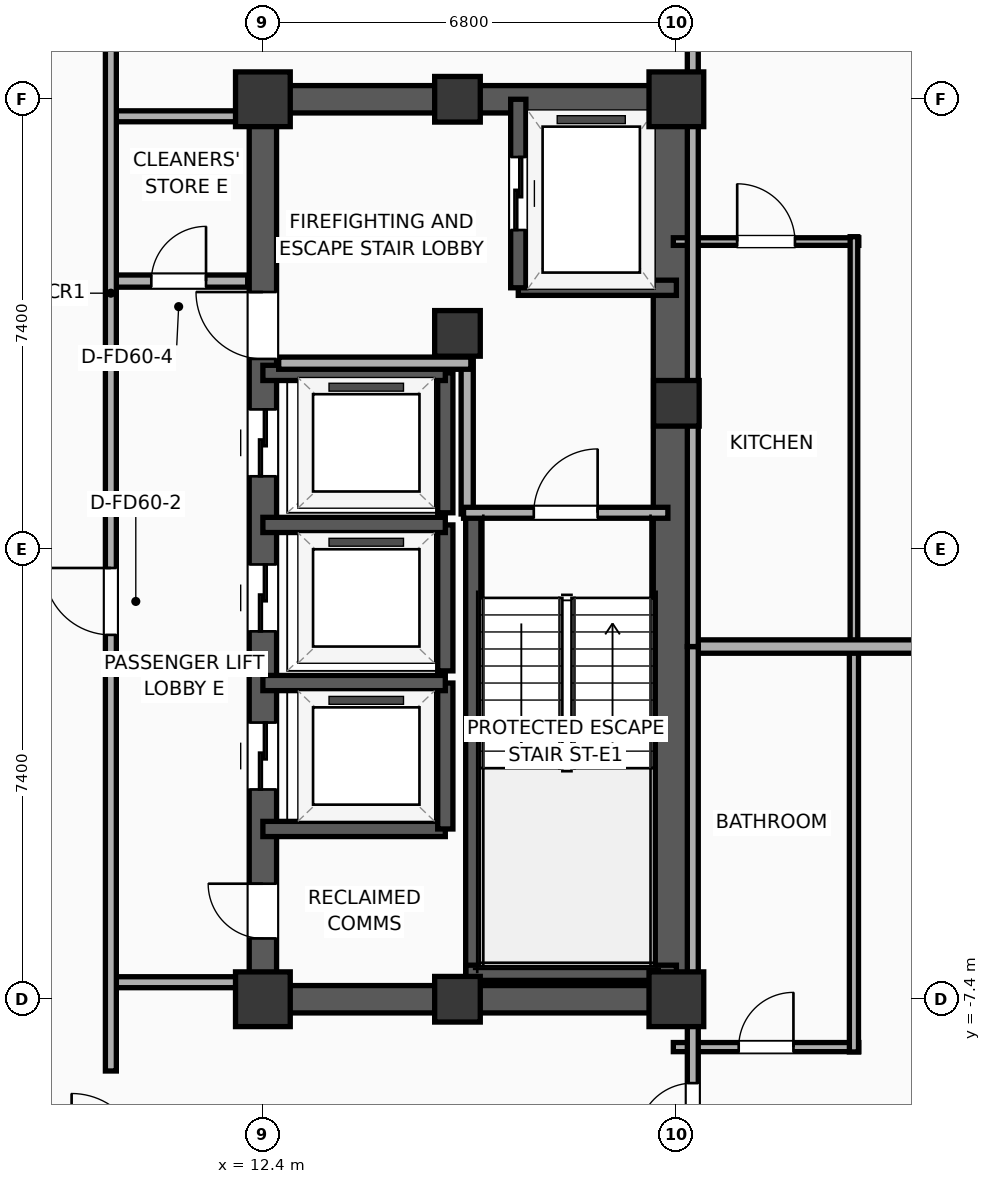
"""IFC4 building model, lengths in metres.
Left out: names, types, materials, properties, quantities, classifications, styles, units other than length and angle.
Written with IfcOpenShell. Run it as: python <this file> out.ifc"""

import sys

from ifc_helpers import new_model, si_unit, direction, frame, frame_2d, origin, origin_2d, place, context, subcontext, project, spatial, rectangle, extrude, element, fill, save


model = new_model("IFC4")
c1 = context("Model", 3, precision=1e-05, world=origin(), true_north=direction((0.0, 1.0)))
c2 = subcontext(c1, "Body", "Model", "MODEL_VIEW")
j1 = project(units=[si_unit("LENGTHUNIT", "METRE"), si_unit("PLANEANGLEUNIT", "RADIAN")], contexts=[c1])
p1 = place(None, origin())
s1 = spatial("IfcSite", under=j1, at=p1, CompositionType="ELEMENT")
p2 = place(p1, origin())
s2 = spatial("IfcBuilding", under=s1, at=p2, CompositionType="ELEMENT")
p3 = place(p2, frame((0.0, 0.0, 200.2)))
s3 = spatial("IfcBuildingStorey", under=s2, at=p3, CompositionType="ELEMENT", Elevation=200.2)
p4 = place(p3, frame((12.4, -7.4, 0.0), z_axis=(0.0, 0.0, 1.0), x_axis=(1.0, 0.0, 0.0)))
e1 = element("IfcColumn", 1, at=p4, inside=s3, PredefinedType="COLUMN", context=c2, shape_type="SweptSolid", body=[
    extrude(rectangle(XDim=0.9, YDim=0.9, at=origin_2d()), origin(), (0.0, 0.0, 1.0), 3.9),
])
p5 = place(p3, frame((15.6, 3.55, 0.0), z_axis=(0.0, 0.0, 1.0), x_axis=(1.0, 0.0, 0.0)))
e2 = element("IfcColumn", 2, at=p5, inside=s3, PredefinedType="COLUMN", context=c2, shape_type="SweptSolid", body=[
    extrude(rectangle(XDim=0.75, YDim=0.75, at=origin_2d()), origin(), (0.0, 0.0, 1.0), 3.9),
])
p6 = place(p3, frame((12.4, 7.4, 0.0), z_axis=(0.0, 0.0, 1.0), x_axis=(1.0, 0.0, 0.0)))
e3 = element("IfcColumn", 3, at=p6, inside=s3, PredefinedType="COLUMN", context=c2, shape_type="SweptSolid", body=[
    extrude(rectangle(XDim=0.9, YDim=0.9, at=origin_2d()), origin(), (0.0, 0.0, 1.0), 3.9),
])
for number, where, z_axis, x_axis in (
    (4, (15.6, -7.4, 0.0), (0.0, 0.0, 1.0), (1.0, 0.0, 0.0)),
    (5, (15.6, 7.4, 0.0), (0.0, 0.0, 1.0), (1.0, 0.0, 0.0)),
):
    element("IfcColumn", number, at=place(p3, frame(where, z_axis=z_axis, x_axis=x_axis)), inside=s3, PredefinedType="COLUMN", context=c2, shape_type="SweptSolid", body=[
        extrude(rectangle(XDim=0.75, YDim=0.75, at=origin_2d()), origin(), (0.0, 0.0, 1.0), 3.9),
    ])
p7 = place(p3, frame((19.2, -7.4, 0.0), z_axis=(0.0, 0.0, 1.0), x_axis=(1.0, 0.0, 0.0)))
e6 = element("IfcColumn", 6, at=p7, inside=s3, PredefinedType="COLUMN", context=c2, shape_type="SweptSolid", body=[
    extrude(rectangle(XDim=0.9, YDim=0.9, at=origin_2d()), origin(), (0.0, 0.0, 1.0), 3.9),
])
p8 = place(p3, frame((19.2, 2.4, 0.0), z_axis=(0.0, 0.0, 1.0), x_axis=(1.0, 0.0, 0.0)))
e7 = element("IfcColumn", 7, at=p8, inside=s3, PredefinedType="COLUMN", context=c2, shape_type="SweptSolid", body=[
    extrude(rectangle(XDim=0.75, YDim=0.75, at=origin_2d()), origin(), (0.0, 0.0, 1.0), 3.9),
])
p9 = place(p3, frame((19.2, 7.4, 0.0), z_axis=(0.0, 0.0, 1.0), x_axis=(1.0, 0.0, 0.0)))
e8 = element("IfcColumn", 8, at=p9, inside=s3, PredefinedType="COLUMN", context=c2, shape_type="SweptSolid", body=[
    extrude(rectangle(XDim=0.9, YDim=0.9, at=origin_2d()), origin(), (0.0, 0.0, 1.0), 3.9),
])
for number, where, z_axis, x_axis in (
    (9, (12.175, -7.4, 0.0), (0.0, 0.0, 1.0), (1.0, 0.0, 0.0)),
    (10, (12.175, 7.4, 0.0), (0.0, 0.0, 1.0), (1.0, 0.0, 0.0)),
):
    element("IfcWall", number, at=place(p3, frame(where, z_axis=z_axis, x_axis=x_axis)), inside=s3, PredefinedType="SHEAR", context=c2, shape_type="SweptSolid", body=[
        extrude(rectangle(XDim=7.25, YDim=0.45, at=frame_2d((3.625, 0.0))), origin(), (0.0, 0.0, 1.0), 3.65),
    ])
p10 = place(p3, frame((12.4, -7.4, 0.0), z_axis=(0.0, 0.0, 1.0), x_axis=(0.0, 1.0, 0.0)))
e11 = element("IfcWall", 11, at=p10, inside=s3, PredefinedType="SHEAR", context=c2, shape_type="SweptSolid", body=[
    extrude(rectangle(XDim=14.8, YDim=0.45, at=frame_2d((7.4, 0.0))), origin(), (0.0, 0.0, 1.0), 3.65),
])
p11 = place(p10, frame((3.45, 0.0, 0.0)))
e12 = element("IfcOpeningElement", 12, at=p11, cuts=e11, PredefinedType="OPENING", context=c2, shape_type="SweptSolid", body=[
    extrude(rectangle(XDim=1.1, YDim=2.05, at=frame_2d((0.55, 1.025))), frame((0.0, 0.235, 0.0), z_axis=(0.0, -1.0, 0.0), x_axis=(1.0, 0.0, 0.0)), (0.0, 0.0, 1.0), 0.47),
])
p12 = place(p10, frame((6.05, 0.0, 0.0)))
e13 = element("IfcOpeningElement", 13, at=p12, cuts=e11, PredefinedType="OPENING", context=c2, shape_type="SweptSolid", body=[
    extrude(rectangle(XDim=1.1, YDim=2.05, at=frame_2d((0.55, 1.025))), frame((0.0, 0.235, 0.0), z_axis=(0.0, -1.0, 0.0), x_axis=(1.0, 0.0, 0.0)), (0.0, 0.0, 1.0), 0.47),
])
p13 = place(p10, frame((8.6, 0.0, 0.0)))
e14 = element("IfcOpeningElement", 14, at=p13, cuts=e11, PredefinedType="OPENING", context=c2, shape_type="SweptSolid", body=[
    extrude(rectangle(XDim=1.1, YDim=2.05, at=frame_2d((0.55, 1.025))), frame((0.0, 0.235, 0.0), z_axis=(0.0, -1.0, 0.0), x_axis=(1.0, 0.0, 0.0)), (0.0, 0.0, 1.0), 0.47),
])
p14 = place(p10, frame((10.53, 0.0, 0.0)))
e15 = element("IfcOpeningElement", 15, at=p14, cuts=e11, PredefinedType="OPENING", context=c2, shape_type="SweptSolid", body=[
    extrude(rectangle(XDim=1.1, YDim=2.05, at=frame_2d((0.55, 1.025))), frame((0.0, 0.235, 0.0), z_axis=(0.0, -1.0, 0.0), x_axis=(1.0, 0.0, 0.0)), (0.0, 0.0, 1.0), 0.47),
])
p15 = place(p10, frame((1.0, 0.0, 0.0)))
e16 = element("IfcOpeningElement", 16, at=p15, cuts=e11, PredefinedType="OPENING", context=c2, shape_type="SweptSolid", body=[
    extrude(rectangle(XDim=0.9, YDim=2.05, at=frame_2d((0.45, 1.025))), frame((0.0, 0.235, 0.0), z_axis=(0.0, -1.0, 0.0), x_axis=(1.0, 0.0, 0.0)), (0.0, 0.0, 1.0), 0.47),
])
p16 = place(p3, frame((19.145, -7.4, 0.0), z_axis=(0.0, 0.0, 1.0), x_axis=(0.0, 1.0, 0.0)))
e17 = element("IfcWall", 17, at=p16, inside=s3, PredefinedType="SHEAR", context=c2, shape_type="SweptSolid", body=[
    extrude(rectangle(XDim=14.8, YDim=0.65, at=frame_2d((7.4, 0.0))), origin(), (0.0, 0.0, 1.0), 3.65),
])
p17 = place(p3, frame((15.86, -7.085, 0.0), z_axis=(0.0, 0.0, 1.0), x_axis=(0.0, 1.0, 0.0)))
e18 = element("IfcWall", 18, at=p17, inside=s3, PredefinedType="SOLIDWALL", context=c2, shape_type="SweptSolid", body=[
    extrude(rectangle(XDim=7.685, YDim=0.25, at=frame_2d((3.843, 0.0))), origin(), (0.0, 0.0, 1.0), 3.65),
])
p18 = place(p3, frame((15.74, -6.965, 0.0), z_axis=(0.0, 0.0, 1.0), x_axis=(1.0, 0.0, 0.0)))
e19 = element("IfcWall", 19, at=p18, inside=s3, PredefinedType="SOLIDWALL", context=c2, shape_type="SweptSolid", body=[
    extrude(rectangle(XDim=3.46, YDim=0.25, at=frame_2d((1.73, 0.0))), origin(), (0.0, 0.0, 1.0), 3.65),
])
p19 = place(p3, frame((16.6, 4.3, 0.0), z_axis=(0.0, 0.0, 1.0), x_axis=(1.0, 0.0, 0.0)))
e20 = element("IfcWall", 20, at=p19, inside=s3, PredefinedType="SOLIDWALL", context=c2, shape_type="SweptSolid", body=[
    extrude(rectangle(XDim=2.6, YDim=0.25, at=frame_2d((1.3, 0.0))), origin(), (0.0, 0.0, 1.0), 3.65),
])
p20 = place(p3, frame((16.6, 7.4, 0.0), z_axis=(0.0, 0.0, 1.0), x_axis=(0.0, -1.0, 0.0)))
e21 = element("IfcWall", 21, at=p20, inside=s3, PredefinedType="SOLIDWALL", context=c2, shape_type="SweptSolid", body=[
    extrude(rectangle(XDim=3.1, YDim=0.25, at=frame_2d((1.55, 0.0))), origin(), (0.0, 0.0, 1.0), 3.65),
])
p21 = place(p20, frame((0.95, 0.0, 0.0)))
e22 = element("IfcOpeningElement", 22, at=p21, cuts=e21, PredefinedType="OPENING", context=c2, shape_type="SweptSolid", body=[
    extrude(rectangle(XDim=1.2, YDim=2.05, at=frame_2d((0.6, 1.025))), frame((0.0, 0.135, 0.0), z_axis=(0.0, -1.0, 0.0), x_axis=(1.0, 0.0, 0.0)), (0.0, 0.0, 1.0), 0.27),
])
p22 = place(p3, frame((12.4, -4.6, 0.0), z_axis=(0.0, 0.0, 1.0), x_axis=(1.0, 0.0, 0.0)))
e23 = element("IfcWall", 23, at=p22, inside=s3, PredefinedType="SOLIDWALL", context=c2, shape_type="SweptSolid", body=[
    extrude(rectangle(XDim=3.0, YDim=0.25, at=frame_2d((1.5, 0.0))), origin(), (0.0, 0.0, 1.0), 3.65),
])
p23 = place(p3, frame((15.4, -4.6, 0.0), z_axis=(0.0, 0.0, 1.0), x_axis=(0.0, 1.0, 0.0)))
e24 = element("IfcWall", 24, at=p23, inside=s3, PredefinedType="SOLIDWALL", context=c2, shape_type="SweptSolid", body=[
    extrude(rectangle(XDim=2.4, YDim=0.25, at=frame_2d((1.2, 0.0))), origin(), (0.0, 0.0, 1.0), 3.65),
])
p24 = place(p3, frame((15.4, -2.2, 0.0), z_axis=(0.0, 0.0, 1.0), x_axis=(-1.0, 0.0, 0.0)))
e25 = element("IfcWall", 25, at=p24, inside=s3, PredefinedType="SOLIDWALL", context=c2, shape_type="SweptSolid", body=[
    extrude(rectangle(XDim=3.0, YDim=0.25, at=frame_2d((1.5, 0.0))), origin(), (0.0, 0.0, 1.0), 3.65),
])
p25 = place(p3, frame((15.4, -2.0, 0.0), z_axis=(0.0, 0.0, 1.0), x_axis=(0.0, 1.0, 0.0)))
e26 = element("IfcWall", 26, at=p25, inside=s3, PredefinedType="SOLIDWALL", context=c2, shape_type="SweptSolid", body=[
    extrude(rectangle(XDim=2.4, YDim=0.25, at=frame_2d((1.2, 0.0))), origin(), (0.0, 0.0, 1.0), 3.65),
])
p26 = place(p3, frame((15.4, 0.4, 0.0), z_axis=(0.0, 0.0, 1.0), x_axis=(-1.0, 0.0, 0.0)))
e27 = element("IfcWall", 27, at=p26, inside=s3, PredefinedType="SOLIDWALL", context=c2, shape_type="SweptSolid", body=[
    extrude(rectangle(XDim=3.0, YDim=0.25, at=frame_2d((1.5, 0.0))), origin(), (0.0, 0.0, 1.0), 3.65),
])
p27 = place(p3, frame((15.4, 0.6, 0.0), z_axis=(0.0, 0.0, 1.0), x_axis=(0.0, 1.0, 0.0)))
e28 = element("IfcWall", 28, at=p27, inside=s3, PredefinedType="SOLIDWALL", context=c2, shape_type="SweptSolid", body=[
    extrude(rectangle(XDim=2.3, YDim=0.25, at=frame_2d((1.15, 0.0))), origin(), (0.0, 0.0, 1.0), 3.65),
])
p28 = place(p3, frame((15.4, 2.9, 0.0), z_axis=(0.0, 0.0, 1.0), x_axis=(-1.0, 0.0, 0.0)))
e29 = element("IfcWall", 29, at=p28, inside=s3, PredefinedType="SOLIDWALL", context=c2, shape_type="SweptSolid", body=[
    extrude(rectangle(XDim=3.0, YDim=0.25, at=frame_2d((1.5, 0.0))), origin(), (0.0, 0.0, 1.0), 3.65),
])
p29 = place(p3, frame((15.76, 0.58, 0.0), z_axis=(0.0, 0.0, 1.0), x_axis=(0.0, 1.0, 0.0)))
e30 = element("IfcWall", 30, at=p29, inside=s3, PredefinedType="PARTITIONING", context=c2, shape_type="SweptSolid", body=[
    extrude(rectangle(XDim=2.52, YDim=0.2, at=frame_2d((1.26, 0.0))), origin(), (0.0, 0.0, 1.0), 3.65),
])
p30 = place(p3, frame((12.66, 3.06, 0.0), z_axis=(0.0, 0.0, 1.0), x_axis=(1.0, 0.0, 0.0)))
e31 = element("IfcWall", 31, at=p30, inside=s3, PredefinedType="PARTITIONING", context=c2, shape_type="SweptSolid", body=[
    extrude(rectangle(XDim=3.16, YDim=0.2, at=frame_2d((1.58, 0.0))), origin(), (0.0, 0.0, 1.0), 3.65),
])
p31 = place(p3, frame((15.7, 0.6, 0.0), z_axis=(0.0, 0.0, 1.0), x_axis=(1.0, 0.0, 0.0)))
e32 = element("IfcWall", 32, at=p31, inside=s3, PredefinedType="PARTITIONING", context=c2, shape_type="SweptSolid", body=[
    extrude(rectangle(XDim=3.36, YDim=0.18, at=frame_2d((1.68, 0.0))), origin(), (0.0, 0.0, 1.0), 3.65),
])
p32 = place(p31, frame((1.155, 0.0, 0.0)))
e33 = element("IfcOpeningElement", 33, at=p32, cuts=e32, PredefinedType="OPENING", context=c2, shape_type="SweptSolid", body=[
    extrude(rectangle(XDim=1.05, YDim=2.05, at=frame_2d((0.525, 1.025))), frame((0.0, 0.1, 0.0), z_axis=(0.0, -1.0, 0.0), x_axis=(1.0, 0.0, 0.0)), (0.0, 0.0, 1.0), 0.2),
])
p33 = place(p3, frame((9.88, 4.41, 0.0), z_axis=(0.0, 0.0, 1.0), x_axis=(1.0, 0.0, 0.0)))
e34 = element("IfcWall", 34, at=p33, inside=s3, PredefinedType="PARTITIONING", context=c2, shape_type="SweptSolid", body=[
    extrude(rectangle(XDim=2.27, YDim=0.2, at=frame_2d((1.135, 0.0))), origin(), (0.0, 0.0, 1.0), 3.65),
])
p34 = place(p33, frame((0.685, 0.0, 0.0)))
e35 = element("IfcOpeningElement", 35, at=p34, cuts=e34, PredefinedType="OPENING", context=c2, shape_type="SweptSolid", body=[
    extrude(rectangle(XDim=0.9, YDim=2.05, at=frame_2d((0.45, 1.025))), frame((0.0, 0.11, 0.0), z_axis=(0.0, -1.0, 0.0), x_axis=(1.0, 0.0, 0.0)), (0.0, 0.0, 1.0), 0.22),
])
for number, where, z_axis, x_axis in (
    (36, (9.88, 7.12, 0.0), (0.0, 0.0, 1.0), (1.0, 0.0, 0.0)),
    (37, (9.88, -7.12, 0.0), (0.0, 0.0, 1.0), (1.0, 0.0, 0.0)),
):
    element("IfcWall", number, at=place(p3, frame(where, z_axis=z_axis, x_axis=x_axis)), inside=s3, PredefinedType="PARTITIONING", context=c2, shape_type="SweptSolid", body=[
        extrude(rectangle(XDim=2.27, YDim=0.18, at=frame_2d((1.135, 0.0))), origin(), (0.0, 0.0, 1.0), 3.65),
    ])
p35 = place(p3, frame((9.9, -8.58, 0.0), z_axis=(0.0, 0.0, 1.0), x_axis=(0.0, 1.0, 0.0)))
e38 = element("IfcWall", 38, at=p35, inside=s3, PredefinedType="PARTITIONING", context=c2, shape_type="SweptSolid", body=[
    extrude(rectangle(XDim=17.16, YDim=0.18, at=frame_2d((8.58, 0.0))), origin(), (0.0, 0.0, 1.0), 3.65),
])
p36 = place(p35, frame((7.172, 0.0, 0.0)))
e39 = element("IfcOpeningElement", 39, at=p36, cuts=e38, PredefinedType="OPENING", context=c2, shape_type="SweptSolid", body=[
    extrude(rectangle(XDim=1.1, YDim=2.05, at=frame_2d((0.55, 1.025))), frame((0.0, 0.1, 0.0), z_axis=(0.0, -1.0, 0.0), x_axis=(1.0, 0.0, 0.0)), (0.0, 0.0, 1.0), 0.2),
])
p37 = place(p3, frame((19.15, -8.187, 0.0), z_axis=(0.0, 0.0, 1.0), x_axis=(1.0, 0.0, 0.0)))
e40 = element("IfcWall", 40, at=p37, inside=s3, PredefinedType="PLUMBINGWALL", context=c2, shape_type="SweptSolid", body=[
    extrude(rectangle(XDim=3.05, YDim=0.15, at=frame_2d((1.525, 0.0))), origin(), (0.0, 0.0, 1.0), 3.65),
])
p38 = place(p37, frame((1.075, 0.0, 0.0)))
e41 = element("IfcOpeningElement", 41, at=p38, cuts=e40, PredefinedType="OPENING", context=c2, shape_type="SweptSolid", body=[
    extrude(rectangle(XDim=0.9, YDim=2.05, at=frame_2d((0.45, 1.025))), frame((0.0, 0.085, 0.0), z_axis=(0.0, -1.0, 0.0), x_axis=(1.0, 0.0, 0.0)), (0.0, 0.0, 1.0), 0.17),
])
p39 = place(p3, frame((22.12, -8.267, 0.0), z_axis=(0.0, 0.0, 1.0), x_axis=(0.0, 1.0, 0.0)))
e42 = element("IfcWall", 42, at=p39, inside=s3, PredefinedType="PLUMBINGWALL", context=c2, shape_type="SweptSolid", body=[
    extrude(rectangle(XDim=6.647, YDim=0.15, at=frame_2d((3.323, 0.0))), origin(), (0.0, 0.0, 1.0), 3.65),
])
p40 = place(p3, frame((19.15, 5.06, 0.0), z_axis=(0.0, 0.0, 1.0), x_axis=(1.0, 0.0, 0.0)))
e43 = element("IfcWall", 43, at=p40, inside=s3, PredefinedType="PARTITIONING", context=c2, shape_type="SweptSolid", body=[
    extrude(rectangle(XDim=3.05, YDim=0.125, at=frame_2d((1.525, 0.0))), origin(), (0.0, 0.0, 1.0), 3.65),
])
p41 = place(p40, frame((1.05, 0.0, 0.0)))
e44 = element("IfcOpeningElement", 44, at=p41, cuts=e43, PredefinedType="OPENING", context=c2, shape_type="SweptSolid", body=[
    extrude(rectangle(XDim=0.95, YDim=2.05, at=frame_2d((0.475, 1.025))), frame((0.0, 0.073, 0.0), z_axis=(0.0, -1.0, 0.0), x_axis=(1.0, 0.0, 0.0)), (0.0, 0.0, 1.0), 0.145),
])
p42 = place(p3, frame((22.12, -1.58, 0.0), z_axis=(0.0, 0.0, 1.0), x_axis=(0.0, 1.0, 0.0)))
e45 = element("IfcWall", 45, at=p42, inside=s3, PredefinedType="PARTITIONING", context=c2, shape_type="SweptSolid", body=[
    extrude(rectangle(XDim=6.72, YDim=0.125, at=frame_2d((3.36, 0.0))), origin(), (0.0, 0.0, 1.0), 3.65),
])
p43 = place(p3, frame((19.47, -1.6, 0.0), z_axis=(0.0, 0.0, 1.0), x_axis=(1.0, 0.0, 0.0)))
e46 = element("IfcWall", 46, at=p43, inside=s3, PredefinedType="PARTITIONING", context=c2, shape_type="SweptSolid", body=[
    extrude(rectangle(XDim=10.76, YDim=0.22, at=frame_2d((5.38, 0.0))), origin(), (0.0, 0.0, 1.0), 3.65),
])
p44 = place(p3, frame((19.47, -18.83, 0.0), z_axis=(0.0, 0.0, 1.0), x_axis=(0.0, 1.0, 0.0)))
e47 = element("IfcWall", 47, at=p44, inside=s3, PredefinedType="PARTITIONING", context=c2, shape_type="SweptSolid", body=[
    extrude(rectangle(XDim=17.23, YDim=0.18, at=frame_2d((8.615, 0.0))), origin(), (0.0, 0.0, 1.0), 3.65),
])
p45 = place(p44, frame((9.151, 0.0, 0.0)))
e48 = element("IfcOpeningElement", 48, at=p45, cuts=e47, PredefinedType="OPENING", context=c2, shape_type="SweptSolid", body=[
    extrude(rectangle(XDim=0.9, YDim=2.05, at=frame_2d((0.45, 1.025))), frame((0.0, 0.1, 0.0), z_axis=(0.0, -1.0, 0.0), x_axis=(1.0, 0.0, 0.0)), (0.0, 0.0, 1.0), 0.2),
])
p46 = place(p3, frame((19.47, -1.6, 0.0), z_axis=(0.0, 0.0, 1.0), x_axis=(0.0, 1.0, 0.0)))
e49 = element("IfcWall", 49, at=p46, inside=s3, PredefinedType="PARTITIONING", context=c2, shape_type="SweptSolid", body=[
    extrude(rectangle(XDim=21.63, YDim=0.18, at=frame_2d((10.815, 0.0))), origin(), (0.0, 0.0, 1.0), 3.65),
])
p47 = place(p46, frame((10.38, 0.0, 0.0)))
e50 = element("IfcOpeningElement", 50, at=p47, cuts=e49, PredefinedType="OPENING", context=c2, shape_type="SweptSolid", body=[
    extrude(rectangle(XDim=0.9, YDim=2.05, at=frame_2d((0.45, 1.025))), frame((0.0, 0.1, 0.0), z_axis=(0.0, -1.0, 0.0), x_axis=(1.0, 0.0, 0.0)), (0.0, 0.0, 1.0), 0.2),
])
p48 = place(p21, origin())
e51 = element("IfcDoor", 51, at=p48, inside=s3, OperationType="SLIDING_TO_LEFT", PredefinedType="DOOR", context=c2, shape_type="SweptSolid", body=[
    extrude(rectangle(XDim=1.2, YDim=2.05, at=frame_2d((0.6, 1.025))), frame((0.0, 0.025, 0.0), z_axis=(0.0, -1.0, 0.0), x_axis=(1.0, 0.0, 0.0)), (0.0, 0.0, 1.0), 0.05),
])
fill(e22, e51)
p49 = place(p11, origin())
e52 = element("IfcDoor", 52, at=p49, inside=s3, OperationType="SLIDING_TO_LEFT", PredefinedType="DOOR", context=c2, shape_type="SweptSolid", body=[
    extrude(rectangle(XDim=1.1, YDim=2.05, at=frame_2d((0.55, 1.025))), frame((0.0, 0.025, 0.0), z_axis=(0.0, -1.0, 0.0), x_axis=(1.0, 0.0, 0.0)), (0.0, 0.0, 1.0), 0.05),
])
fill(e12, e52)
p50 = place(p12, origin())
e53 = element("IfcDoor", 53, at=p50, inside=s3, OperationType="SLIDING_TO_LEFT", PredefinedType="DOOR", context=c2, shape_type="SweptSolid", body=[
    extrude(rectangle(XDim=1.1, YDim=2.05, at=frame_2d((0.55, 1.025))), frame((0.0, 0.025, 0.0), z_axis=(0.0, -1.0, 0.0), x_axis=(1.0, 0.0, 0.0)), (0.0, 0.0, 1.0), 0.05),
])
fill(e13, e53)
p51 = place(p13, origin())
e54 = element("IfcDoor", 54, at=p51, inside=s3, OperationType="SLIDING_TO_LEFT", PredefinedType="DOOR", context=c2, shape_type="SweptSolid", body=[
    extrude(rectangle(XDim=1.1, YDim=2.05, at=frame_2d((0.55, 1.025))), frame((0.0, 0.025, 0.0), z_axis=(0.0, -1.0, 0.0), x_axis=(1.0, 0.0, 0.0)), (0.0, 0.0, 1.0), 0.05),
])
fill(e14, e54)
p52 = place(p32, origin())
e55 = element("IfcDoor", 55, at=p52, inside=s3, OperationType="SINGLE_SWING_RIGHT", PredefinedType="DOOR", context=c2, shape_type="SweptSolid", body=[
    extrude(rectangle(XDim=1.05, YDim=2.05, at=frame_2d((0.525, 1.025))), frame((0.0, 0.025, 0.0), z_axis=(0.0, -1.0, 0.0), x_axis=(1.0, 0.0, 0.0)), (0.0, 0.0, 1.0), 0.05),
])
fill(e33, e55)
p53 = place(p34, origin())
e56 = element("IfcDoor", 56, at=p53, inside=s3, OperationType="SINGLE_SWING_RIGHT", PredefinedType="DOOR", context=c2, shape_type="SweptSolid", body=[
    extrude(rectangle(XDim=0.9, YDim=2.05, at=frame_2d((0.45, 1.025))), frame((0.0, 0.025, 0.0), z_axis=(0.0, -1.0, 0.0), x_axis=(1.0, 0.0, 0.0)), (0.0, 0.0, 1.0), 0.05),
])
fill(e35, e56)
p54 = place(p36, origin())
e57 = element("IfcDoor", 57, at=p54, inside=s3, OperationType="SINGLE_SWING_RIGHT", PredefinedType="DOOR", context=c2, shape_type="SweptSolid", body=[
    extrude(rectangle(XDim=1.1, YDim=2.05, at=frame_2d((0.55, 1.025))), frame((0.0, 0.025, 0.0), z_axis=(0.0, -1.0, 0.0), x_axis=(1.0, 0.0, 0.0)), (0.0, 0.0, 1.0), 0.05),
])
fill(e39, e57)
p55 = place(p38, origin())
e58 = element("IfcDoor", 58, at=p55, inside=s3, OperationType="SINGLE_SWING_RIGHT", PredefinedType="DOOR", context=c2, shape_type="SweptSolid", body=[
    extrude(rectangle(XDim=0.9, YDim=2.05, at=frame_2d((0.45, 1.025))), frame((0.0, 0.025, 0.0), z_axis=(0.0, -1.0, 0.0), x_axis=(1.0, 0.0, 0.0)), (0.0, 0.0, 1.0), 0.05),
])
fill(e41, e58)
p56 = place(p41, origin())
e59 = element("IfcDoor", 59, at=p56, inside=s3, OperationType="SINGLE_SWING_LEFT", PredefinedType="DOOR", context=c2, shape_type="SweptSolid", body=[
    extrude(rectangle(XDim=0.95, YDim=2.05, at=frame_2d((0.475, 1.025))), frame((0.0, 0.025, 0.0), z_axis=(0.0, -1.0, 0.0), x_axis=(1.0, 0.0, 0.0)), (0.0, 0.0, 1.0), 0.05),
])
fill(e44, e59)
p57 = place(p45, origin())
e60 = element("IfcDoor", 60, at=p57, inside=s3, OperationType="SINGLE_SWING_LEFT", PredefinedType="DOOR", context=c2, shape_type="SweptSolid", body=[
    extrude(rectangle(XDim=0.9, YDim=2.05, at=frame_2d((0.45, 1.025))), frame((0.0, 0.025, 0.0), z_axis=(0.0, -1.0, 0.0), x_axis=(1.0, 0.0, 0.0)), (0.0, 0.0, 1.0), 0.05),
])
fill(e48, e60)
p58 = place(p14, origin())
e61 = element("IfcDoor", 61, at=p58, inside=s3, OperationType="SINGLE_SWING_RIGHT", PredefinedType="DOOR", context=c2, shape_type="SweptSolid", body=[
    extrude(rectangle(XDim=1.1, YDim=2.05, at=frame_2d((0.55, 1.025))), frame((0.0, 0.025, 0.0), z_axis=(0.0, -1.0, 0.0), x_axis=(1.0, 0.0, 0.0)), (0.0, 0.0, 1.0), 0.05),
])
fill(e15, e61)
p59 = place(p15, origin())
e62 = element("IfcDoor", 62, at=p59, inside=s3, OperationType="SINGLE_SWING_RIGHT", PredefinedType="DOOR", context=c2, shape_type="SweptSolid", body=[
    extrude(rectangle(XDim=0.9, YDim=2.05, at=frame_2d((0.45, 1.025))), frame((0.0, 0.025, 0.0), z_axis=(0.0, -1.0, 0.0), x_axis=(1.0, 0.0, 0.0)), (0.0, 0.0, 1.0), 0.05),
])
fill(e16, e62)
save(model, sys.argv[1])
